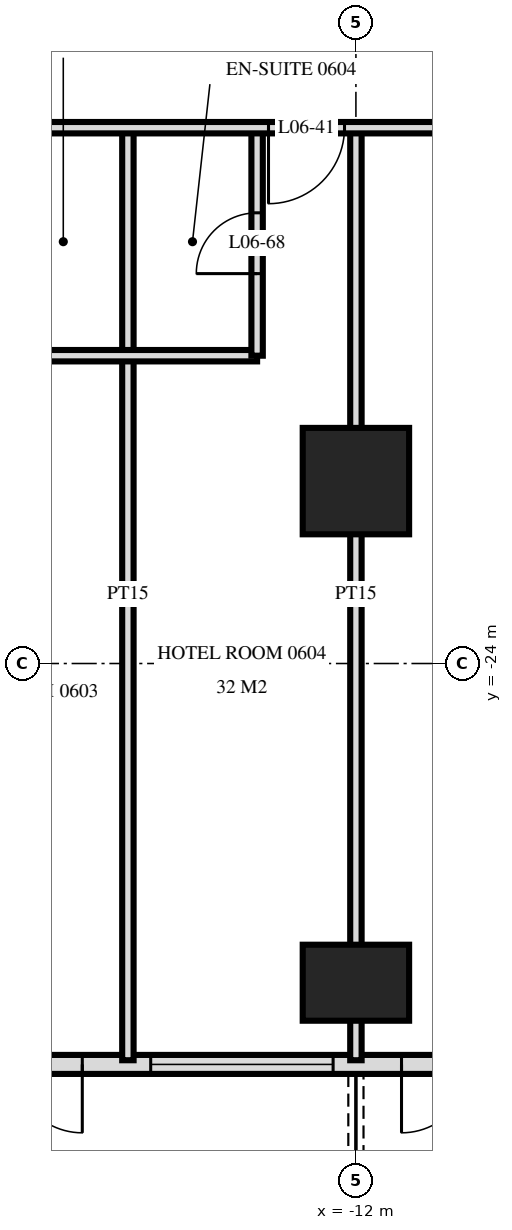
"""IFC4 building model, lengths in metres.
Left out: names, types, materials, properties, quantities, classifications, styles, units other than length and angle.
Written with IfcOpenShell. Run it as: python <this file> out.ifc"""

import sys

from ifc_helpers import new_model, si_unit, direction, frame, frame_2d, origin, origin_2d, place, context, subcontext, project, spatial, rectangle, extrude, element, fill, save


model = new_model("IFC4")
c1 = context("Model", 3, precision=1e-05, world=origin(), true_north=direction((0.0, 1.0)))
c2 = subcontext(c1, "Body", "Model", "MODEL_VIEW")
j1 = project(units=[si_unit("LENGTHUNIT", "METRE"), si_unit("PLANEANGLEUNIT", "RADIAN")], contexts=[c1])
p1 = place(None, origin())
s1 = spatial("IfcSite", under=j1, at=p1, CompositionType="ELEMENT")
p2 = place(p1, origin())
s2 = spatial("IfcBuilding", under=s1, at=p2, CompositionType="ELEMENT")
p3 = place(p2, frame((0.0, 0.0, 31.2)))
s3 = spatial("IfcBuildingStorey", under=s2, at=p3, CompositionType="ELEMENT", Elevation=31.2)
p4 = place(p3, frame((-12.0, -28.2, 0.0), z_axis=(0.0, 0.0, 1.0), x_axis=(1.0, 0.0, 0.0)))
e1 = element("IfcColumn", 1, at=p4, inside=s3, PredefinedType="COLUMN", context=c2, shape_type="SweptSolid", body=[
    extrude(rectangle(XDim=1.4, YDim=1.0, at=origin_2d()), origin(), (0.0, 0.0, 1.0), 3.6),
])
p5 = place(p3, frame((-12.0, -21.6, 0.0), z_axis=(0.0, 0.0, 1.0), x_axis=(1.0, 0.0, 0.0)))
e2 = element("IfcColumn", 2, at=p5, inside=s3, PredefinedType="COLUMN", context=c2, shape_type="SweptSolid", body=[
    extrude(rectangle(XDim=1.4, YDim=1.4, at=origin_2d()), origin(), (0.0, 0.0, 1.0), 3.6),
])
p6 = place(p3, frame((-28.775, -29.275, 0.0), z_axis=(0.0, 0.0, 1.0), x_axis=(1.0, 0.0, 0.0)))
e3 = element("IfcWall", 3, at=p6, inside=s3, PredefinedType="SOLIDWALL", context=c2, shape_type="SweptSolid", body=[
    extrude(rectangle(XDim=57.551, YDim=0.25, at=frame_2d((28.775, 0.0))), origin(), (0.0, 0.0, 1.0), 3.32),
])
p7 = place(p6, frame((0.575, 0.0, 0.0)))
e4 = element("IfcOpeningElement", 4, at=p7, cuts=e3, PredefinedType="OPENING", context=c2, shape_type="SweptSolid", body=[
    extrude(rectangle(XDim=1.8, YDim=2.4, at=frame_2d((0.9, 1.2))), frame((0.0, 0.135, 0.0), z_axis=(0.0, -1.0, 0.0), x_axis=(1.0, 0.0, 0.0)), (0.0, 0.0, 1.0), 0.27),
])
p8 = place(p6, frame((5.375, 0.0, 0.0)))
e5 = element("IfcOpeningElement", 5, at=p8, cuts=e3, PredefinedType="OPENING", context=c2, shape_type="SweptSolid", body=[
    extrude(rectangle(XDim=1.8, YDim=2.4, at=frame_2d((0.9, 1.2))), frame((0.0, 0.135, 0.0), z_axis=(0.0, -1.0, 0.0), x_axis=(1.0, 0.0, 0.0)), (0.0, 0.0, 1.0), 0.27),
])
p9 = place(p6, frame((8.075, 0.0, 0.3)))
e6 = element("IfcOpeningElement", 6, at=p9, cuts=e3, PredefinedType="OPENING", context=c2, shape_type="SweptSolid", body=[
    extrude(rectangle(XDim=2.4, YDim=2.1, at=frame_2d((1.2, 1.05))), frame((0.0, 0.135, 0.0), z_axis=(0.0, -1.0, 0.0), x_axis=(1.0, 0.0, 0.0)), (0.0, 0.0, 1.0), 0.27),
])
p10 = place(p6, frame((11.375, 0.0, 0.0)))
e7 = element("IfcOpeningElement", 7, at=p10, cuts=e3, PredefinedType="OPENING", context=c2, shape_type="SweptSolid", body=[
    extrude(rectangle(XDim=1.8, YDim=2.4, at=frame_2d((0.9, 1.2))), frame((0.0, 0.135, 0.0), z_axis=(0.0, -1.0, 0.0), x_axis=(1.0, 0.0, 0.0)), (0.0, 0.0, 1.0), 0.27),
])
p11 = place(p6, frame((14.075, 0.0, 0.3)))
e8 = element("IfcOpeningElement", 8, at=p11, cuts=e3, PredefinedType="OPENING", context=c2, shape_type="SweptSolid", body=[
    extrude(rectangle(XDim=2.4, YDim=2.1, at=frame_2d((1.2, 1.05))), frame((0.0, 0.135, 0.0), z_axis=(0.0, -1.0, 0.0), x_axis=(1.0, 0.0, 0.0)), (0.0, 0.0, 1.0), 0.27),
])
p12 = place(p6, frame((17.375, 0.0, 0.0)))
e9 = element("IfcOpeningElement", 9, at=p12, cuts=e3, PredefinedType="OPENING", context=c2, shape_type="SweptSolid", body=[
    extrude(rectangle(XDim=1.8, YDim=2.4, at=frame_2d((0.9, 1.2))), frame((0.0, 0.135, 0.0), z_axis=(0.0, -1.0, 0.0), x_axis=(1.0, 0.0, 0.0)), (0.0, 0.0, 1.0), 0.27),
])
p13 = place(p6, frame((20.075, 0.0, 0.3)))
e10 = element("IfcOpeningElement", 10, at=p13, cuts=e3, PredefinedType="OPENING", context=c2, shape_type="SweptSolid", body=[
    extrude(rectangle(XDim=2.4, YDim=2.1, at=frame_2d((1.2, 1.05))), frame((0.0, 0.135, 0.0), z_axis=(0.0, -1.0, 0.0), x_axis=(1.0, 0.0, 0.0)), (0.0, 0.0, 1.0), 0.27),
])
p14 = place(p6, frame((23.075, 0.0, 0.3)))
e11 = element("IfcOpeningElement", 11, at=p14, cuts=e3, PredefinedType="OPENING", context=c2, shape_type="SweptSolid", body=[
    extrude(rectangle(XDim=2.4, YDim=2.1, at=frame_2d((1.2, 1.05))), frame((0.0, 0.135, 0.0), z_axis=(0.0, -1.0, 0.0), x_axis=(1.0, 0.0, 0.0)), (0.0, 0.0, 1.0), 0.27),
])
p15 = place(p6, frame((26.375, 0.0, 0.0)))
e12 = element("IfcOpeningElement", 12, at=p15, cuts=e3, PredefinedType="OPENING", context=c2, shape_type="SweptSolid", body=[
    extrude(rectangle(XDim=1.8, YDim=2.4, at=frame_2d((0.9, 1.2))), frame((0.0, 0.135, 0.0), z_axis=(0.0, -1.0, 0.0), x_axis=(1.0, 0.0, 0.0)), (0.0, 0.0, 1.0), 0.27),
])
p16 = place(p6, frame((29.375, 0.0, 0.0)))
e13 = element("IfcOpeningElement", 13, at=p16, cuts=e3, PredefinedType="OPENING", context=c2, shape_type="SweptSolid", body=[
    extrude(rectangle(XDim=1.8, YDim=2.4, at=frame_2d((0.9, 1.2))), frame((0.0, 0.135, 0.0), z_axis=(0.0, -1.0, 0.0), x_axis=(1.0, 0.0, 0.0)), (0.0, 0.0, 1.0), 0.27),
])
p17 = place(p6, frame((32.075, 0.0, 0.3)))
e14 = element("IfcOpeningElement", 14, at=p17, cuts=e3, PredefinedType="OPENING", context=c2, shape_type="SweptSolid", body=[
    extrude(rectangle(XDim=2.4, YDim=2.1, at=frame_2d((1.2, 1.05))), frame((0.0, 0.135, 0.0), z_axis=(0.0, -1.0, 0.0), x_axis=(1.0, 0.0, 0.0)), (0.0, 0.0, 1.0), 0.27),
])
p18 = place(p6, frame((35.375, 0.0, 0.0)))
e15 = element("IfcOpeningElement", 15, at=p18, cuts=e3, PredefinedType="OPENING", context=c2, shape_type="SweptSolid", body=[
    extrude(rectangle(XDim=1.8, YDim=2.4, at=frame_2d((0.9, 1.2))), frame((0.0, 0.135, 0.0), z_axis=(0.0, -1.0, 0.0), x_axis=(1.0, 0.0, 0.0)), (0.0, 0.0, 1.0), 0.27),
])
p19 = place(p6, frame((38.075, 0.0, 0.3)))
e16 = element("IfcOpeningElement", 16, at=p19, cuts=e3, PredefinedType="OPENING", context=c2, shape_type="SweptSolid", body=[
    extrude(rectangle(XDim=2.4, YDim=2.1, at=frame_2d((1.2, 1.05))), frame((0.0, 0.135, 0.0), z_axis=(0.0, -1.0, 0.0), x_axis=(1.0, 0.0, 0.0)), (0.0, 0.0, 1.0), 0.27),
])
p20 = place(p6, frame((41.375, 0.0, 0.0)))
e17 = element("IfcOpeningElement", 17, at=p20, cuts=e3, PredefinedType="OPENING", context=c2, shape_type="SweptSolid", body=[
    extrude(rectangle(XDim=1.8, YDim=2.4, at=frame_2d((0.9, 1.2))), frame((0.0, 0.135, 0.0), z_axis=(0.0, -1.0, 0.0), x_axis=(1.0, 0.0, 0.0)), (0.0, 0.0, 1.0), 0.27),
])
p21 = place(p6, frame((44.075, 0.0, 0.3)))
e18 = element("IfcOpeningElement", 18, at=p21, cuts=e3, PredefinedType="OPENING", context=c2, shape_type="SweptSolid", body=[
    extrude(rectangle(XDim=2.4, YDim=2.1, at=frame_2d((1.2, 1.05))), frame((0.0, 0.135, 0.0), z_axis=(0.0, -1.0, 0.0), x_axis=(1.0, 0.0, 0.0)), (0.0, 0.0, 1.0), 0.27),
])
p22 = place(p6, frame((47.075, 0.0, 0.3)))
e19 = element("IfcOpeningElement", 19, at=p22, cuts=e3, PredefinedType="OPENING", context=c2, shape_type="SweptSolid", body=[
    extrude(rectangle(XDim=2.4, YDim=2.1, at=frame_2d((1.2, 1.05))), frame((0.0, 0.135, 0.0), z_axis=(0.0, -1.0, 0.0), x_axis=(1.0, 0.0, 0.0)), (0.0, 0.0, 1.0), 0.27),
])
p23 = place(p6, frame((50.375, 0.0, 0.0)))
e20 = element("IfcOpeningElement", 20, at=p23, cuts=e3, PredefinedType="OPENING", context=c2, shape_type="SweptSolid", body=[
    extrude(rectangle(XDim=1.8, YDim=2.4, at=frame_2d((0.9, 1.2))), frame((0.0, 0.135, 0.0), z_axis=(0.0, -1.0, 0.0), x_axis=(1.0, 0.0, 0.0)), (0.0, 0.0, 1.0), 0.27),
])
p24 = place(p6, frame((53.375, 0.0, 0.0)))
e21 = element("IfcOpeningElement", 21, at=p24, cuts=e3, PredefinedType="OPENING", context=c2, shape_type="SweptSolid", body=[
    extrude(rectangle(XDim=1.8, YDim=2.4, at=frame_2d((0.9, 1.2))), frame((0.0, 0.135, 0.0), z_axis=(0.0, -1.0, 0.0), x_axis=(1.0, 0.0, 0.0)), (0.0, 0.0, 1.0), 0.27),
])
p25 = place(p3, frame((-12.0, -29.22, 0.0), z_axis=(0.0, 0.0, 1.0), x_axis=(0.0, 1.0, 0.0)))
e22 = element("IfcWall", 22, at=p25, inside=s3, PredefinedType="PARTITIONING", context=c2, shape_type="SweptSolid", body=[
    extrude(rectangle(XDim=12.27, YDim=0.15, at=frame_2d((6.135, 0.0))), origin(), (0.0, 0.0, 1.0), 3.32),
])
p26 = place(p3, frame((-13.3, -19.95, 0.0), z_axis=(0.0, 0.0, 1.0), x_axis=(0.0, 1.0, 0.0)))
e23 = element("IfcWall", 23, at=p26, inside=s3, PredefinedType="PARTITIONING", context=c2, shape_type="SweptSolid", body=[
    extrude(rectangle(XDim=3.0, YDim=0.15, at=frame_2d((1.5, 0.0))), origin(), (0.0, 0.0, 1.0), 3.32),
])
p27 = place(p26, frame((1.08, 0.0, 0.0)))
e24 = element("IfcOpeningElement", 24, at=p27, cuts=e23, PredefinedType="OPENING", context=c2, shape_type="SweptSolid", body=[
    extrude(rectangle(XDim=0.8, YDim=2.1, at=frame_2d((0.4, 1.05))), frame((0.0, 0.085, 0.0), z_axis=(0.0, -1.0, 0.0), x_axis=(1.0, 0.0, 0.0)), (0.0, 0.0, 1.0), 0.17),
])
p28 = place(p3, frame((-15.0, -29.22, 0.0), z_axis=(0.0, 0.0, 1.0), x_axis=(0.0, 1.0, 0.0)))
e25 = element("IfcWall", 25, at=p28, inside=s3, PredefinedType="PARTITIONING", context=c2, shape_type="SweptSolid", body=[
    extrude(rectangle(XDim=12.27, YDim=0.15, at=frame_2d((6.135, 0.0))), origin(), (0.0, 0.0, 1.0), 3.32),
])
p29 = place(p3, frame((-16.7, -19.95, 0.0), z_axis=(0.0, 0.0, 1.0), x_axis=(1.0, 0.0, 0.0)))
e26 = element("IfcWall", 26, at=p29, inside=s3, PredefinedType="PARTITIONING", context=c2, shape_type="SweptSolid", body=[
    extrude(rectangle(XDim=3.4, YDim=0.15, at=frame_2d((1.7, 0.0))), origin(), (0.0, 0.0, 1.0), 3.32),
])
p30 = place(p3, frame((-33.12, -16.95, 0.0), z_axis=(0.0, 0.0, 1.0), x_axis=(1.0, 0.0, 0.0)))
e27 = element("IfcWall", 27, at=p30, inside=s3, PredefinedType="PARTITIONING", context=c2, shape_type="SweptSolid", body=[
    extrude(rectangle(XDim=66.24, YDim=0.15, at=frame_2d((33.12, 0.0))), origin(), (0.0, 0.0, 1.0), 3.32),
])
p31 = place(p30, frame((9.27, 0.0, 0.0)))
e28 = element("IfcOpeningElement", 28, at=p31, cuts=e27, PredefinedType="OPENING", context=c2, shape_type="SweptSolid", body=[
    extrude(rectangle(XDim=1.0, YDim=2.1, at=frame_2d((0.5, 1.05))), frame((0.0, 0.085, 0.0), z_axis=(0.0, -1.0, 0.0), x_axis=(1.0, 0.0, 0.0)), (0.0, 0.0, 1.0), 0.17),
])
p32 = place(p30, frame((13.97, 0.0, 0.0)))
e29 = element("IfcOpeningElement", 29, at=p32, cuts=e27, PredefinedType="OPENING", context=c2, shape_type="SweptSolid", body=[
    extrude(rectangle(XDim=1.0, YDim=2.1, at=frame_2d((0.5, 1.05))), frame((0.0, 0.085, 0.0), z_axis=(0.0, -1.0, 0.0), x_axis=(1.0, 0.0, 0.0)), (0.0, 0.0, 1.0), 0.17),
])
p33 = place(p30, frame((15.27, 0.0, 0.0)))
e30 = element("IfcOpeningElement", 30, at=p33, cuts=e27, PredefinedType="OPENING", context=c2, shape_type="SweptSolid", body=[
    extrude(rectangle(XDim=1.0, YDim=2.1, at=frame_2d((0.5, 1.05))), frame((0.0, 0.085, 0.0), z_axis=(0.0, -1.0, 0.0), x_axis=(1.0, 0.0, 0.0)), (0.0, 0.0, 1.0), 0.17),
])
p34 = place(p30, frame((19.97, 0.0, 0.0)))
e31 = element("IfcOpeningElement", 31, at=p34, cuts=e27, PredefinedType="OPENING", context=c2, shape_type="SweptSolid", body=[
    extrude(rectangle(XDim=1.0, YDim=2.1, at=frame_2d((0.5, 1.05))), frame((0.0, 0.085, 0.0), z_axis=(0.0, -1.0, 0.0), x_axis=(1.0, 0.0, 0.0)), (0.0, 0.0, 1.0), 0.17),
])
p35 = place(p30, frame((22.27, 0.0, 0.0)))
e32 = element("IfcOpeningElement", 32, at=p35, cuts=e27, PredefinedType="OPENING", context=c2, shape_type="SweptSolid", body=[
    extrude(rectangle(XDim=1.0, YDim=2.1, at=frame_2d((0.5, 1.05))), frame((0.0, 0.085, 0.0), z_axis=(0.0, -1.0, 0.0), x_axis=(1.0, 0.0, 0.0)), (0.0, 0.0, 1.0), 0.17),
])
p36 = place(p30, frame((28.97, 0.0, 0.0)))
e33 = element("IfcOpeningElement", 33, at=p36, cuts=e27, PredefinedType="OPENING", context=c2, shape_type="SweptSolid", body=[
    extrude(rectangle(XDim=1.0, YDim=2.1, at=frame_2d((0.5, 1.05))), frame((0.0, 0.085, 0.0), z_axis=(0.0, -1.0, 0.0), x_axis=(1.0, 0.0, 0.0)), (0.0, 0.0, 1.0), 0.17),
])
p37 = place(p30, frame((30.27, 0.0, 0.0)))
e34 = element("IfcOpeningElement", 34, at=p37, cuts=e27, PredefinedType="OPENING", context=c2, shape_type="SweptSolid", body=[
    extrude(rectangle(XDim=1.0, YDim=2.1, at=frame_2d((0.5, 1.05))), frame((0.0, 0.085, 0.0), z_axis=(0.0, -1.0, 0.0), x_axis=(1.0, 0.0, 0.0)), (0.0, 0.0, 1.0), 0.17),
])
p38 = place(p30, frame((34.97, 0.0, 0.0)))
e35 = element("IfcOpeningElement", 35, at=p38, cuts=e27, PredefinedType="OPENING", context=c2, shape_type="SweptSolid", body=[
    extrude(rectangle(XDim=1.0, YDim=2.1, at=frame_2d((0.5, 1.05))), frame((0.0, 0.085, 0.0), z_axis=(0.0, -1.0, 0.0), x_axis=(1.0, 0.0, 0.0)), (0.0, 0.0, 1.0), 0.17),
])
p39 = place(p30, frame((36.27, 0.0, 0.0)))
e36 = element("IfcOpeningElement", 36, at=p39, cuts=e27, PredefinedType="OPENING", context=c2, shape_type="SweptSolid", body=[
    extrude(rectangle(XDim=1.0, YDim=2.1, at=frame_2d((0.5, 1.05))), frame((0.0, 0.085, 0.0), z_axis=(0.0, -1.0, 0.0), x_axis=(1.0, 0.0, 0.0)), (0.0, 0.0, 1.0), 0.17),
])
p40 = place(p30, frame((40.97, 0.0, 0.0)))
e37 = element("IfcOpeningElement", 37, at=p40, cuts=e27, PredefinedType="OPENING", context=c2, shape_type="SweptSolid", body=[
    extrude(rectangle(XDim=1.0, YDim=2.1, at=frame_2d((0.5, 1.05))), frame((0.0, 0.085, 0.0), z_axis=(0.0, -1.0, 0.0), x_axis=(1.0, 0.0, 0.0)), (0.0, 0.0, 1.0), 0.17),
])
p41 = place(p30, frame((42.27, 0.0, 0.0)))
e38 = element("IfcOpeningElement", 38, at=p41, cuts=e27, PredefinedType="OPENING", context=c2, shape_type="SweptSolid", body=[
    extrude(rectangle(XDim=1.0, YDim=2.1, at=frame_2d((0.5, 1.05))), frame((0.0, 0.085, 0.0), z_axis=(0.0, -1.0, 0.0), x_axis=(1.0, 0.0, 0.0)), (0.0, 0.0, 1.0), 0.17),
])
p42 = place(p30, frame((46.97, 0.0, 0.0)))
e39 = element("IfcOpeningElement", 39, at=p42, cuts=e27, PredefinedType="OPENING", context=c2, shape_type="SweptSolid", body=[
    extrude(rectangle(XDim=1.0, YDim=2.1, at=frame_2d((0.5, 1.05))), frame((0.0, 0.085, 0.0), z_axis=(0.0, -1.0, 0.0), x_axis=(1.0, 0.0, 0.0)), (0.0, 0.0, 1.0), 0.17),
])
p43 = place(p30, frame((48.27, 0.0, 0.0)))
e40 = element("IfcOpeningElement", 40, at=p43, cuts=e27, PredefinedType="OPENING", context=c2, shape_type="SweptSolid", body=[
    extrude(rectangle(XDim=1.0, YDim=2.1, at=frame_2d((0.5, 1.05))), frame((0.0, 0.085, 0.0), z_axis=(0.0, -1.0, 0.0), x_axis=(1.0, 0.0, 0.0)), (0.0, 0.0, 1.0), 0.17),
])
p44 = place(p30, frame((52.97, 0.0, 0.0)))
e41 = element("IfcOpeningElement", 41, at=p44, cuts=e27, PredefinedType="OPENING", context=c2, shape_type="SweptSolid", body=[
    extrude(rectangle(XDim=1.0, YDim=2.1, at=frame_2d((0.5, 1.05))), frame((0.0, 0.085, 0.0), z_axis=(0.0, -1.0, 0.0), x_axis=(1.0, 0.0, 0.0)), (0.0, 0.0, 1.0), 0.17),
])
p45 = place(p30, frame((54.27, 0.0, 0.0)))
e42 = element("IfcOpeningElement", 42, at=p45, cuts=e27, PredefinedType="OPENING", context=c2, shape_type="SweptSolid", body=[
    extrude(rectangle(XDim=1.0, YDim=2.1, at=frame_2d((0.5, 1.05))), frame((0.0, 0.085, 0.0), z_axis=(0.0, -1.0, 0.0), x_axis=(1.0, 0.0, 0.0)), (0.0, 0.0, 1.0), 0.17),
])
p46 = place(p30, frame((4.4, 0.0, 0.0)))
e43 = element("IfcOpeningElement", 43, at=p46, cuts=e27, PredefinedType="OPENING", context=c2, shape_type="SweptSolid", body=[
    extrude(rectangle(XDim=1.0, YDim=2.1, at=frame_2d((0.5, 1.05))), frame((0.0, 0.085, 0.0), z_axis=(0.0, -1.0, 0.0), x_axis=(1.0, 0.0, 0.0)), (0.0, 0.0, 1.0), 0.17),
])
p47 = place(p30, frame((60.8, 0.0, 0.0)))
e44 = element("IfcOpeningElement", 44, at=p47, cuts=e27, PredefinedType="OPENING", context=c2, shape_type="SweptSolid", body=[
    extrude(rectangle(XDim=1.0, YDim=2.1, at=frame_2d((0.5, 1.05))), frame((0.0, 0.085, 0.0), z_axis=(0.0, -1.0, 0.0), x_axis=(1.0, 0.0, 0.0)), (0.0, 0.0, 1.0), 0.17),
])
p48 = place(p10, frame((0.9, 0.0, 0.0), z_axis=(0.0, 0.0, 1.0), x_axis=(-1.0, 0.0, 0.0)))
e45 = element("IfcDoor", 45, at=p48, inside=s3, OperationType="DOUBLE_DOOR_SINGLE_SWING", PredefinedType="DOOR", context=c2, shape_type="SweptSolid", body=[
    extrude(rectangle(XDim=1.8, YDim=2.4, at=frame_2d((0.0, 1.2))), frame((0.0, -0.025, 0.0), z_axis=(0.0, 1.0, 0.0), x_axis=(-1.0, 0.0, 0.0)), (0.0, 0.0, 1.0), 0.05),
])
fill(e7, e45)
p49 = place(p11, origin())
e46 = element("IfcWindow", 46, at=p49, inside=s3, PartitioningType="SINGLE_PANEL", PredefinedType="WINDOW", context=c2, shape_type="SweptSolid", body=[
    extrude(rectangle(XDim=2.4, YDim=2.1, at=frame_2d((1.2, 1.05))), frame((0.0, 0.03, 0.0), z_axis=(0.0, -1.0, 0.0), x_axis=(1.0, 0.0, 0.0)), (0.0, 0.0, 1.0), 0.06),
])
fill(e8, e46)
p50 = place(p12, frame((0.9, 0.0, 0.0), z_axis=(0.0, 0.0, 1.0), x_axis=(-1.0, 0.0, 0.0)))
e47 = element("IfcDoor", 47, at=p50, inside=s3, OperationType="DOUBLE_DOOR_SINGLE_SWING", PredefinedType="DOOR", context=c2, shape_type="SweptSolid", body=[
    extrude(rectangle(XDim=1.8, YDim=2.4, at=frame_2d((0.0, 1.2))), frame((0.0, -0.025, 0.0), z_axis=(0.0, 1.0, 0.0), x_axis=(-1.0, 0.0, 0.0)), (0.0, 0.0, 1.0), 0.05),
])
fill(e9, e47)
p51 = place(p34, frame((0.5, 0.0, 0.0), z_axis=(0.0, 0.0, 1.0), x_axis=(-1.0, 0.0, 0.0)))
e48 = element("IfcDoor", 48, at=p51, inside=s3, OperationType="SINGLE_SWING_LEFT", PredefinedType="DOOR", context=c2, shape_type="SweptSolid", body=[
    extrude(rectangle(XDim=1.0, YDim=2.1, at=frame_2d((0.0, 1.05))), frame((0.0, -0.025, 0.0), z_axis=(0.0, 1.0, 0.0), x_axis=(-1.0, 0.0, 0.0)), (0.0, 0.0, 1.0), 0.05),
])
fill(e31, e48)
p52 = place(p27, origin())
e49 = element("IfcDoor", 49, at=p52, inside=s3, OperationType="SINGLE_SWING_RIGHT", PredefinedType="DOOR", context=c2, shape_type="SweptSolid", body=[
    extrude(rectangle(XDim=0.8, YDim=2.1, at=frame_2d((0.4, 1.05))), frame((0.0, 0.025, 0.0), z_axis=(0.0, -1.0, 0.0), x_axis=(1.0, 0.0, 0.0)), (0.0, 0.0, 1.0), 0.05),
])
fill(e24, e49)
save(model, sys.argv[1])
